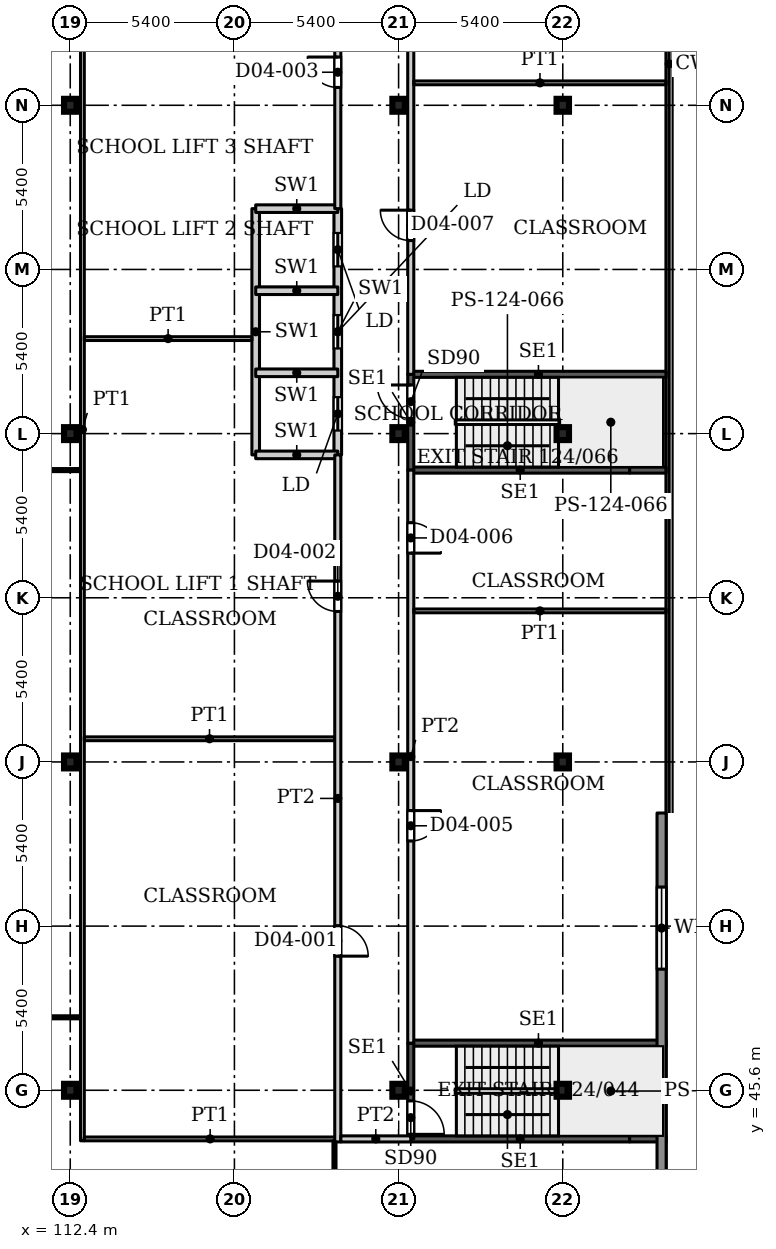
"""IFC4 building model, lengths in metres.
Left out: names, types, materials, properties, quantities, classifications, styles, units other than length and angle.
Written with IfcOpenShell. Run it as: python <this file> out.ifc"""

import sys

from ifc_helpers import new_model, si_unit, direction, frame, frame_2d, origin, origin_2d, place, context, subcontext, project, spatial, rectangle, i_section, extrude, source, transform, mapped, element, fill, save


model = new_model("IFC4")
c1 = context("Model", 3, precision=1e-05, world=origin(), true_north=direction((0.0, 1.0)))
c2 = subcontext(c1, "Body", "Model", "MODEL_VIEW")
j1 = project(units=[si_unit("LENGTHUNIT", "METRE"), si_unit("PLANEANGLEUNIT", "RADIAN")], contexts=[c1])
p1 = place(None, origin())
s1 = spatial("IfcSite", under=j1, at=p1, CompositionType="ELEMENT")
p2 = place(p1, origin())
s2 = spatial("IfcBuilding", under=s1, at=p2, CompositionType="ELEMENT")
p3 = place(p2, frame((0.0, 0.0, 21.5)))
s3 = spatial("IfcBuildingStorey", under=s2, at=p3, CompositionType="ELEMENT", Elevation=21.5)
for number, where, z_axis, x_axis in (
    (1, (112.4, 45.6, 0.0), (0.0, 0.0, 1.0), (1.0, 0.0, 0.0)),
    (2, (123.2, 45.6, 0.0), (0.0, 0.0, 1.0), (1.0, 0.0, 0.0)),
    (3, (128.6, 45.6, 0.0), (0.0, 0.0, 1.0), (1.0, 0.0, 0.0)),
    (4, (112.4, 56.4, 0.0), (0.0, 0.0, 1.0), (1.0, 0.0, 0.0)),
    (5, (123.2, 56.4, 0.0), (0.0, 0.0, 1.0), (1.0, 0.0, 0.0)),
    (6, (128.6, 56.4, 0.0), (0.0, 0.0, 1.0), (1.0, 0.0, 0.0)),
    (7, (112.4, 67.2, 0.0), (0.0, 0.0, 1.0), (1.0, 0.0, 0.0)),
    (8, (123.2, 67.2, 0.0), (0.0, 0.0, 1.0), (1.0, 0.0, 0.0)),
    (9, (128.6, 67.2, 0.0), (0.0, 0.0, 1.0), (1.0, 0.0, 0.0)),
    (10, (112.4, 78.0, 0.0), (0.0, 0.0, 1.0), (1.0, 0.0, 0.0)),
    (11, (123.2, 78.0, 0.0), (0.0, 0.0, 1.0), (1.0, 0.0, 0.0)),
    (12, (128.6, 78.0, 0.0), (0.0, 0.0, 1.0), (1.0, 0.0, 0.0)),
):
    element("IfcColumn", number, at=place(p3, frame(where, z_axis=z_axis, x_axis=x_axis)), inside=s3, PredefinedType="COLUMN", context=c2, shape_type="SweptSolid", body=[
        extrude(i_section(OverallWidth=0.409, OverallDepth=0.425, WebThickness=0.033, FlangeThickness=0.052, FilletRadius=0.013, at=origin_2d()), origin(), (0.0, 0.0, 1.0), 4.5),
    ])
p4 = place(p3, frame((131.85, 54.72, 0.0), z_axis=(0.0, 0.0, 1.0), x_axis=(0.0, -1.0, 0.0)))
e13 = element("IfcWall", 13, at=p4, inside=s3, PredefinedType="SOLIDWALL", context=c2, shape_type="SweptSolid", body=[
    extrude(rectangle(XDim=38.72, YDim=0.3, at=frame_2d((19.36, 0.0))), origin(), (0.0, 0.0, 1.0), 4.25),
])
p5 = place(p4, frame((2.435, 0.0, 0.9)))
e14 = element("IfcOpeningElement", 14, at=p5, cuts=e13, PredefinedType="OPENING", context=c2, shape_type="SweptSolid", body=[
    extrude(rectangle(XDim=2.7, YDim=2.1, at=frame_2d((1.35, 1.05))), frame((0.0, 0.16, 0.0), z_axis=(0.0, -1.0, 0.0), x_axis=(1.0, 0.0, 0.0)), (0.0, 0.0, 1.0), 0.32),
])
p6 = place(p4, frame((13.58, 0.0, 0.9)))
e15 = element("IfcOpeningElement", 15, at=p6, cuts=e13, PredefinedType="OPENING", context=c2, shape_type="SweptSolid", body=[
    extrude(rectangle(XDim=2.7, YDim=2.1, at=frame_2d((1.35, 1.05))), frame((0.0, 0.16, 0.0), z_axis=(0.0, -1.0, 0.0), x_axis=(1.0, 0.0, 0.0)), (0.0, 0.0, 1.0), 0.32),
])
p7 = place(p4, frame((26.16, 0.0, 0.9)))
e16 = element("IfcOpeningElement", 16, at=p7, cuts=e13, PredefinedType="OPENING", context=c2, shape_type="SweptSolid", body=[
    extrude(rectangle(XDim=2.7, YDim=2.1, at=frame_2d((1.35, 1.05))), frame((0.0, 0.16, 0.0), z_axis=(0.0, -1.0, 0.0), x_axis=(1.0, 0.0, 0.0)), (0.0, 0.0, 1.0), 0.32),
])
p8 = place(p3, frame((118.5, 66.5, 0.0), z_axis=(0.0, 0.0, 1.0), x_axis=(0.0, 1.0, 0.0)))
e17 = element("IfcWall", 17, at=p8, inside=s3, PredefinedType="PARTITIONING", context=c2, shape_type="SweptSolid", body=[
    extrude(rectangle(XDim=8.1, YDim=0.25, at=frame_2d((4.05, 0.0))), origin(), (0.0, 0.0, 1.0), 4.5),
])
p9 = place(p3, frame((121.2, 66.5, 0.0), z_axis=(0.0, 0.0, 1.0), x_axis=(0.0, 1.0, 0.0)))
e18 = element("IfcWall", 18, at=p9, inside=s3, PredefinedType="PARTITIONING", context=c2, shape_type="SweptSolid", body=[
    extrude(rectangle(XDim=8.1, YDim=0.25, at=frame_2d((4.05, 0.0))), origin(), (0.0, 0.0, 1.0), 4.5),
])
p10 = place(p9, frame((0.8, 0.0, 0.0)))
e19 = element("IfcOpeningElement", 19, at=p10, cuts=e18, PredefinedType="OPENING", context=c2, shape_type="SweptSolid", body=[
    extrude(rectangle(XDim=1.1, YDim=2.2, at=frame_2d((0.55, 1.1))), frame((0.0, 0.135, 0.0), z_axis=(0.0, -1.0, 0.0), x_axis=(1.0, 0.0, 0.0)), (0.0, 0.0, 1.0), 0.27),
])
p11 = place(p9, frame((3.5, 0.0, 0.0)))
e20 = element("IfcOpeningElement", 20, at=p11, cuts=e18, PredefinedType="OPENING", context=c2, shape_type="SweptSolid", body=[
    extrude(rectangle(XDim=1.1, YDim=2.2, at=frame_2d((0.55, 1.1))), frame((0.0, 0.135, 0.0), z_axis=(0.0, -1.0, 0.0), x_axis=(1.0, 0.0, 0.0)), (0.0, 0.0, 1.0), 0.27),
])
p12 = place(p9, frame((6.2, 0.0, 0.0)))
e21 = element("IfcOpeningElement", 21, at=p12, cuts=e18, PredefinedType="OPENING", context=c2, shape_type="SweptSolid", body=[
    extrude(rectangle(XDim=1.1, YDim=2.2, at=frame_2d((0.55, 1.1))), frame((0.0, 0.135, 0.0), z_axis=(0.0, -1.0, 0.0), x_axis=(1.0, 0.0, 0.0)), (0.0, 0.0, 1.0), 0.27),
])
for number, where, z_axis, x_axis in (
    (22, (118.5, 66.5, 0.0), (0.0, 0.0, 1.0), (1.0, 0.0, 0.0)),
    (23, (118.5, 69.2, 0.0), (0.0, 0.0, 1.0), (1.0, 0.0, 0.0)),
    (24, (118.5, 71.9, 0.0), (0.0, 0.0, 1.0), (1.0, 0.0, 0.0)),
    (25, (118.5, 74.6, 0.0), (0.0, 0.0, 1.0), (1.0, 0.0, 0.0)),
):
    element("IfcWall", number, at=place(p3, frame(where, z_axis=z_axis, x_axis=x_axis)), inside=s3, PredefinedType="PARTITIONING", context=c2, shape_type="SweptSolid", body=[
        extrude(rectangle(XDim=2.7, YDim=0.25, at=frame_2d((1.35, 0.0))), origin(), (0.0, 0.0, 1.0), 4.5),
    ])
p13 = place(p3, frame((123.6, 44.0, 0.0), z_axis=(0.0, 0.0, 1.0), x_axis=(1.0, 0.0, 0.0)))
e26 = element("IfcWall", 26, at=p13, inside=s3, PredefinedType="SHEAR", context=c2, shape_type="SweptSolid", body=[
    extrude(rectangle(XDim=7.2, YDim=0.2, at=frame_2d((3.6, 0.0))), origin(), (0.0, 0.0, 1.0), 4.5),
])
p14 = place(p3, frame((130.8, 44.0, 0.0), z_axis=(0.0, 0.0, 1.0), x_axis=(1.0, 0.0, 0.0)))
e27 = element("IfcWall", 27, at=p14, inside=s3, PredefinedType="SHEAR", context=c2, shape_type="SweptSolid", body=[
    extrude(rectangle(XDim=1.2, YDim=0.2, at=frame_2d((0.6, 0.0))), origin(), (0.0, 0.0, 1.0), 4.5),
])
p15 = place(p3, frame((123.6, 47.15, 0.0), z_axis=(0.0, 0.0, 1.0), x_axis=(1.0, 0.0, 0.0)))
e28 = element("IfcWall", 28, at=p15, inside=s3, PredefinedType="SHEAR", context=c2, shape_type="SweptSolid", body=[
    extrude(rectangle(XDim=8.4, YDim=0.2, at=frame_2d((4.2, 0.0))), origin(), (0.0, 0.0, 1.0), 4.5),
])
p16 = place(p3, frame((123.6, 44.0, 0.0), z_axis=(0.0, 0.0, 1.0), x_axis=(0.0, 1.0, 0.0)))
e29 = element("IfcWall", 29, at=p16, inside=s3, PredefinedType="SHEAR", context=c2, shape_type="SweptSolid", body=[
    extrude(rectangle(XDim=3.15, YDim=0.2, at=frame_2d((1.575, 0.0))), origin(), (0.0, 0.0, 1.0), 4.5),
])
p17 = place(p16, frame((0.15, 0.0, 0.0)))
e30 = element("IfcOpeningElement", 30, at=p17, cuts=e29, PredefinedType="OPENING", context=c2, shape_type="SweptSolid", body=[
    extrude(rectangle(XDim=1.1, YDim=2.2, at=frame_2d((0.55, 1.1))), frame((0.0, 0.11, 0.0), z_axis=(0.0, -1.0, 0.0), x_axis=(1.0, 0.0, 0.0)), (0.0, 0.0, 1.0), 0.22),
])
p18 = place(p3, frame((123.6, 66.0, 0.0), z_axis=(0.0, 0.0, 1.0), x_axis=(1.0, 0.0, 0.0)))
e31 = element("IfcWall", 31, at=p18, inside=s3, PredefinedType="SHEAR", context=c2, shape_type="SweptSolid", body=[
    extrude(rectangle(XDim=7.2, YDim=0.2, at=frame_2d((3.6, 0.0))), origin(), (0.0, 0.0, 1.0), 4.5),
])
p19 = place(p3, frame((130.8, 66.0, 0.0), z_axis=(0.0, 0.0, 1.0), x_axis=(1.0, 0.0, 0.0)))
e32 = element("IfcWall", 32, at=p19, inside=s3, PredefinedType="SHEAR", context=c2, shape_type="SweptSolid", body=[
    extrude(rectangle(XDim=1.2, YDim=0.2, at=frame_2d((0.6, 0.0))), origin(), (0.0, 0.0, 1.0), 4.5),
])
p20 = place(p3, frame((123.6, 69.15, 0.0), z_axis=(0.0, 0.0, 1.0), x_axis=(1.0, 0.0, 0.0)))
e33 = element("IfcWall", 33, at=p20, inside=s3, PredefinedType="SHEAR", context=c2, shape_type="SweptSolid", body=[
    extrude(rectangle(XDim=8.4, YDim=0.2, at=frame_2d((4.2, 0.0))), origin(), (0.0, 0.0, 1.0), 4.5),
])
p21 = place(p3, frame((123.6, 66.0, 0.0), z_axis=(0.0, 0.0, 1.0), x_axis=(0.0, 1.0, 0.0)))
e34 = element("IfcWall", 34, at=p21, inside=s3, PredefinedType="SHEAR", context=c2, shape_type="SweptSolid", body=[
    extrude(rectangle(XDim=3.15, YDim=0.2, at=frame_2d((1.575, 0.0))), origin(), (0.0, 0.0, 1.0), 4.5),
])
p22 = place(p21, frame((1.7, 0.0, 0.0)))
e35 = element("IfcOpeningElement", 35, at=p22, cuts=e34, PredefinedType="OPENING", context=c2, shape_type="SweptSolid", body=[
    extrude(rectangle(XDim=1.1, YDim=2.2, at=frame_2d((0.55, 1.1))), frame((0.0, 0.11, 0.0), z_axis=(0.0, -1.0, 0.0), x_axis=(1.0, 0.0, 0.0)), (0.0, 0.0, 1.0), 0.22),
])
p23 = place(p3, frame((92.6, 48.0, 0.0), z_axis=(0.0, 0.0, 1.0), x_axis=(1.0, 0.0, 0.0)))
e36 = element("IfcWall", 36, at=p23, inside=s3, PredefinedType="PARTITIONING", context=c2, shape_type="SweptSolid", body=[
    extrude(rectangle(XDim=20.138, YDim=0.1, at=frame_2d((10.069, 0.0))), origin(), (0.0, 0.0, 1.0), 4.18),
])
p24 = place(p3, frame((92.7, 66.0, 0.0), z_axis=(0.0, 0.0, 1.0), x_axis=(1.0, 0.0, 0.0)))
e37 = element("IfcWall", 37, at=p24, inside=s3, PredefinedType="PARTITIONING", context=c2, shape_type="SweptSolid", body=[
    extrude(rectangle(XDim=20.038, YDim=0.1, at=frame_2d((10.019, 0.0))), origin(), (0.0, 0.0, 1.0), 4.18),
])
p25 = place(p3, frame((112.8, 43.938, 0.0), z_axis=(0.0, 0.0, 1.0), x_axis=(0.0, 1.0, 0.0)))
e38 = element("IfcWall", 38, at=p25, inside=s3, PredefinedType="PARTITIONING", context=c2, shape_type="SweptSolid", body=[
    extrude(rectangle(XDim=46.787, YDim=0.125, at=frame_2d((23.394, 0.0))), origin(), (0.0, 0.0, 1.0), 4.18),
])
p26 = place(p3, frame((112.862, 44.0, 0.0), z_axis=(0.0, 0.0, 1.0), x_axis=(1.0, 0.0, 0.0)))
e39 = element("IfcWall", 39, at=p26, inside=s3, PredefinedType="PARTITIONING", context=c2, shape_type="SweptSolid", body=[
    extrude(rectangle(XDim=8.279, YDim=0.125, at=frame_2d((4.14, 0.0))), origin(), (0.0, 0.0, 1.0), 4.18),
])
p27 = place(p3, frame((112.862, 57.162, 0.0), z_axis=(0.0, 0.0, 1.0), x_axis=(1.0, 0.0, 0.0)))
e40 = element("IfcWall", 40, at=p27, inside=s3, PredefinedType="PARTITIONING", context=c2, shape_type="SweptSolid", body=[
    extrude(rectangle(XDim=8.238, YDim=0.125, at=frame_2d((4.119, 0.0))), origin(), (0.0, 0.0, 1.0), 4.18),
])
p28 = place(p3, frame((112.862, 70.325, 0.0), z_axis=(0.0, 0.0, 1.0), x_axis=(1.0, 0.0, 0.0)))
e41 = element("IfcWall", 41, at=p28, inside=s3, PredefinedType="PARTITIONING", context=c2, shape_type="SweptSolid", body=[
    extrude(rectangle(XDim=5.514, YDim=0.125, at=frame_2d((2.757, 0.0))), origin(), (0.0, 0.0, 1.0), 4.18),
])
p29 = place(p3, frame((121.091, 35.3, 0.0), z_axis=(0.0, 0.0, 1.0), x_axis=(0.0, 1.0, 0.0)))
e42 = element("IfcWall", 42, at=p29, inside=s3, PredefinedType="PARTITIONING", context=c2, shape_type="SweptSolid", body=[
    extrude(rectangle(XDim=8.638, YDim=0.1, at=frame_2d((4.319, 0.0))), origin(), (0.0, 0.0, 1.0), 4.18),
])
p30 = place(p3, frame((121.2, 43.9, 0.0), z_axis=(0.0, 0.0, 1.0), x_axis=(0.0, 1.0, 0.0)))
e43 = element("IfcWall", 43, at=p30, inside=s3, PredefinedType="PARTITIONING", context=c2, shape_type="SweptSolid", body=[
    extrude(rectangle(XDim=22.6, YDim=0.2, at=frame_2d((11.3, 0.0))), origin(), (0.0, 0.0, 1.0), 4.18),
])
p31 = place(p30, frame((6.112, 0.0, 0.0)))
e44 = element("IfcOpeningElement", 44, at=p31, cuts=e43, PredefinedType="OPENING", context=c2, shape_type="SweptSolid", body=[
    extrude(rectangle(XDim=1.0, YDim=2.1, at=frame_2d((0.5, 1.05))), frame((0.0, 0.11, 0.0), z_axis=(0.0, -1.0, 0.0), x_axis=(1.0, 0.0, 0.0)), (0.0, 0.0, 1.0), 0.22),
])
p32 = place(p30, frame((17.45, 0.0, 0.0)))
e45 = element("IfcOpeningElement", 45, at=p32, cuts=e43, PredefinedType="OPENING", context=c2, shape_type="SweptSolid", body=[
    extrude(rectangle(XDim=1.0, YDim=2.1, at=frame_2d((0.5, 1.05))), frame((0.0, 0.11, 0.0), z_axis=(0.0, -1.0, 0.0), x_axis=(1.0, 0.0, 0.0)), (0.0, 0.0, 1.0), 0.22),
])
p33 = place(p3, frame((121.2, 74.6, 0.0), z_axis=(0.0, 0.0, 1.0), x_axis=(0.0, 1.0, 0.0)))
e46 = element("IfcWall", 46, at=p33, inside=s3, PredefinedType="PARTITIONING", context=c2, shape_type="SweptSolid", body=[
    extrude(rectangle(XDim=16.1, YDim=0.2, at=frame_2d((8.05, 0.0))), origin(), (0.0, 0.0, 1.0), 4.18),
])
p34 = place(p33, frame((3.987, 0.0, 0.0)))
e47 = element("IfcOpeningElement", 47, at=p34, cuts=e46, PredefinedType="OPENING", context=c2, shape_type="SweptSolid", body=[
    extrude(rectangle(XDim=1.0, YDim=2.1, at=frame_2d((0.5, 1.05))), frame((0.0, 0.11, 0.0), z_axis=(0.0, -1.0, 0.0), x_axis=(1.0, 0.0, 0.0)), (0.0, 0.0, 1.0), 0.22),
])
p35 = place(p33, frame((12.05, 0.0, 0.0)))
e48 = element("IfcOpeningElement", 48, at=p35, cuts=e46, PredefinedType="OPENING", context=c2, shape_type="SweptSolid", body=[
    extrude(rectangle(XDim=1.0, YDim=2.1, at=frame_2d((0.5, 1.05))), frame((0.0, 0.11, 0.0), z_axis=(0.0, -1.0, 0.0), x_axis=(1.0, 0.0, 0.0)), (0.0, 0.0, 1.0), 0.22),
])
p36 = place(p3, frame((121.3, 44.0, 0.0), z_axis=(0.0, 0.0, 1.0), x_axis=(1.0, 0.0, 0.0)))
e49 = element("IfcWall", 49, at=p36, inside=s3, PredefinedType="PARTITIONING", context=c2, shape_type="SweptSolid", body=[
    extrude(rectangle(XDim=2.3, YDim=0.2, at=frame_2d((1.15, 0.0))), origin(), (0.0, 0.0, 1.0), 4.18),
])
p37 = place(p3, frame((123.6, 47.15, 0.0), z_axis=(0.0, 0.0, 1.0), x_axis=(0.0, 1.0, 0.0)))
e50 = element("IfcWall", 50, at=p37, inside=s3, PredefinedType="PARTITIONING", context=c2, shape_type="SweptSolid", body=[
    extrude(rectangle(XDim=18.85, YDim=0.2, at=frame_2d((9.425, 0.0))), origin(), (0.0, 0.0, 1.0), 4.18),
])
p38 = place(p37, frame((6.65, 0.0, 0.0)))
e51 = element("IfcOpeningElement", 51, at=p38, cuts=e50, PredefinedType="OPENING", context=c2, shape_type="SweptSolid", body=[
    extrude(rectangle(XDim=1.0, YDim=2.1, at=frame_2d((0.5, 1.05))), frame((0.0, 0.11, 0.0), z_axis=(0.0, -1.0, 0.0), x_axis=(1.0, 0.0, 0.0)), (0.0, 0.0, 1.0), 0.22),
])
p39 = place(p37, frame((16.119, 0.0, 0.0)))
e52 = element("IfcOpeningElement", 52, at=p39, cuts=e50, PredefinedType="OPENING", context=c2, shape_type="SweptSolid", body=[
    extrude(rectangle(XDim=1.0, YDim=2.1, at=frame_2d((0.5, 1.05))), frame((0.0, 0.11, 0.0), z_axis=(0.0, -1.0, 0.0), x_axis=(1.0, 0.0, 0.0)), (0.0, 0.0, 1.0), 0.22),
])
p40 = place(p3, frame((123.6, 69.15, 0.0), z_axis=(0.0, 0.0, 1.0), x_axis=(0.0, 1.0, 0.0)))
e53 = element("IfcWall", 53, at=p40, inside=s3, PredefinedType="PARTITIONING", context=c2, shape_type="SweptSolid", body=[
    extrude(rectangle(XDim=21.55, YDim=0.2, at=frame_2d((10.775, 0.0))), origin(), (0.0, 0.0, 1.0), 4.18),
])
p41 = place(p40, frame((4.4, 0.0, 0.0)))
e54 = element("IfcOpeningElement", 54, at=p41, cuts=e53, PredefinedType="OPENING", context=c2, shape_type="SweptSolid", body=[
    extrude(rectangle(XDim=1.0, YDim=2.1, at=frame_2d((0.5, 1.05))), frame((0.0, 0.11, 0.0), z_axis=(0.0, -1.0, 0.0), x_axis=(1.0, 0.0, 0.0)), (0.0, 0.0, 1.0), 0.22),
])
p42 = place(p40, frame((15.238, 0.0, 0.0)))
e55 = element("IfcOpeningElement", 55, at=p42, cuts=e53, PredefinedType="OPENING", context=c2, shape_type="SweptSolid", body=[
    extrude(rectangle(XDim=1.0, YDim=2.1, at=frame_2d((0.5, 1.05))), frame((0.0, 0.11, 0.0), z_axis=(0.0, -1.0, 0.0), x_axis=(1.0, 0.0, 0.0)), (0.0, 0.0, 1.0), 0.22),
])
p43 = place(p40, frame((11.238, 0.0, 0.0)))
e56 = element("IfcOpeningElement", 56, at=p43, cuts=e53, PredefinedType="OPENING", context=c2, shape_type="SweptSolid", body=[
    extrude(rectangle(XDim=1.2, YDim=2.1, at=frame_2d((0.6, 1.05))), frame((0.0, 0.11, 0.0), z_axis=(0.0, -1.0, 0.0), x_axis=(1.0, 0.0, 0.0)), (0.0, 0.0, 1.0), 0.22),
])
for number, where, z_axis, x_axis in (
    (57, (123.7, 61.369, 0.0), (0.0, 0.0, 1.0), (1.0, 0.0, 0.0)),
    (58, (123.7, 78.738, 0.0), (0.0, 0.0, 1.0), (1.0, 0.0, 0.0)),
):
    element("IfcWall", number, at=place(p3, frame(where, z_axis=z_axis, x_axis=x_axis)), inside=s3, PredefinedType="PARTITIONING", context=c2, shape_type="SweptSolid", body=[
        extrude(rectangle(XDim=8.3, YDim=0.125, at=frame_2d((4.15, 0.0))), origin(), (0.0, 0.0, 1.0), 4.18),
    ])
m1 = source(origin(), c2, "Body", "SweptSolid", [
    extrude(rectangle(XDim=2.7, YDim=2.1, at=frame_2d((1.35, 1.05))), frame((0.0, 0.03, 0.0), z_axis=(0.0, -1.0, 0.0), x_axis=(1.0, 0.0, 0.0)), (0.0, 0.0, 1.0), 0.06),
])
p44 = place(p5, origin())
e59 = element("IfcWindow", 59, at=p44, inside=s3, PartitioningType="SINGLE_PANEL", PredefinedType="WINDOW", context=c2, shape_type="MappedRepresentation", body=[
    mapped(m1, transform((0.0, 0.0, 0.0), x_axis=(1.0, 0.0, 0.0), y_axis=(0.0, 1.0, 0.0), z_axis=(0.0, 0.0, 1.0), scale=1.0)),
])
fill(e14, e59)
m2 = source(origin(), c2, "Body", "SweptSolid", [
    extrude(rectangle(XDim=1.1, YDim=2.2, at=frame_2d((0.55, 1.1))), frame((0.0, 0.025, 0.0), z_axis=(0.0, -1.0, 0.0), x_axis=(1.0, 0.0, 0.0)), (0.0, 0.0, 1.0), 0.05),
])
p45 = place(p10, origin())
e60 = element("IfcDoor", 60, at=p45, inside=s3, OperationType="SLIDING_TO_LEFT", PredefinedType="DOOR", context=c2, shape_type="MappedRepresentation", body=[
    mapped(m2, transform((0.0, 0.0, 0.0), x_axis=(1.0, 0.0, 0.0), y_axis=(0.0, 1.0, 0.0), z_axis=(0.0, 0.0, 1.0), scale=1.0)),
])
fill(e19, e60)
p46 = place(p11, origin())
e61 = element("IfcDoor", 61, at=p46, inside=s3, OperationType="SLIDING_TO_LEFT", PredefinedType="DOOR", context=c2, shape_type="MappedRepresentation", body=[
    mapped(m2, transform((0.0, 0.0, 0.0), x_axis=(1.0, 0.0, 0.0), y_axis=(0.0, 1.0, 0.0), z_axis=(0.0, 0.0, 1.0), scale=1.0)),
])
fill(e20, e61)
p47 = place(p12, origin())
e62 = element("IfcDoor", 62, at=p47, inside=s3, OperationType="SLIDING_TO_LEFT", PredefinedType="DOOR", context=c2, shape_type="MappedRepresentation", body=[
    mapped(m2, transform((0.0, 0.0, 0.0), x_axis=(1.0, 0.0, 0.0), y_axis=(0.0, 1.0, 0.0), z_axis=(0.0, 0.0, 1.0), scale=1.0)),
])
fill(e21, e62)
m3 = source(origin(), c2, "Body", "SweptSolid", [
    extrude(rectangle(XDim=1.1, YDim=2.2, at=frame_2d((0.55, 1.1))), frame((0.0, 0.025, 0.0), z_axis=(0.0, -1.0, 0.0), x_axis=(1.0, 0.0, 0.0)), (0.0, 0.0, 1.0), 0.05),
])
p48 = place(p17, origin())
e63 = element("IfcDoor", 63, at=p48, inside=s3, OperationType="SINGLE_SWING_RIGHT", PredefinedType="DOOR", context=c2, shape_type="MappedRepresentation", body=[
    mapped(m3, transform((0.0, 0.0, 0.0), x_axis=(1.0, 0.0, 0.0), y_axis=(0.0, 1.0, 0.0), z_axis=(0.0, 0.0, 1.0), scale=1.0)),
])
fill(e30, e63)
p49 = place(p22, origin())
e64 = element("IfcDoor", 64, at=p49, inside=s3, OperationType="SINGLE_SWING_LEFT", PredefinedType="DOOR", context=c2, shape_type="MappedRepresentation", body=[
    mapped(m3, transform((0.0, 0.0, 0.0), x_axis=(1.0, 0.0, 0.0), y_axis=(0.0, 1.0, 0.0), z_axis=(0.0, 0.0, 1.0), scale=1.0)),
])
fill(e35, e64)
m4 = source(origin(), c2, "Body", "SweptSolid", [
    extrude(rectangle(XDim=1.0, YDim=2.1, at=frame_2d((0.5, 1.05))), frame((0.0, 0.025, 0.0), z_axis=(0.0, -1.0, 0.0), x_axis=(1.0, 0.0, 0.0)), (0.0, 0.0, 1.0), 0.05),
])
p50 = place(p31, origin())
e65 = element("IfcDoor", 65, at=p50, inside=s3, OperationType="SINGLE_SWING_RIGHT", PredefinedType="DOOR", context=c2, shape_type="MappedRepresentation", body=[
    mapped(m4, transform((0.0, 0.0, 0.0), x_axis=(1.0, 0.0, 0.0), y_axis=(0.0, 1.0, 0.0), z_axis=(0.0, 0.0, 1.0), scale=1.0)),
])
fill(e44, e65)
p51 = place(p32, origin())
e66 = element("IfcDoor", 66, at=p51, inside=s3, OperationType="SINGLE_SWING_LEFT", PredefinedType="DOOR", context=c2, shape_type="MappedRepresentation", body=[
    mapped(m4, transform((0.0, 0.0, 0.0), x_axis=(1.0, 0.0, 0.0), y_axis=(0.0, 1.0, 0.0), z_axis=(0.0, 0.0, 1.0), scale=1.0)),
])
fill(e45, e66)
p52 = place(p34, origin())
e67 = element("IfcDoor", 67, at=p52, inside=s3, OperationType="SINGLE_SWING_LEFT", PredefinedType="DOOR", context=c2, shape_type="MappedRepresentation", body=[
    mapped(m4, transform((0.0, 0.0, 0.0), x_axis=(1.0, 0.0, 0.0), y_axis=(0.0, 1.0, 0.0), z_axis=(0.0, 0.0, 1.0), scale=1.0)),
])
fill(e47, e67)
p53 = place(p38, origin())
e68 = element("IfcDoor", 68, at=p53, inside=s3, OperationType="SINGLE_SWING_RIGHT", PredefinedType="DOOR", context=c2, shape_type="MappedRepresentation", body=[
    mapped(m4, transform((0.0, 0.0, 0.0), x_axis=(1.0, 0.0, 0.0), y_axis=(0.0, 1.0, 0.0), z_axis=(0.0, 0.0, 1.0), scale=1.0)),
])
fill(e51, e68)
p54 = place(p39, origin())
e69 = element("IfcDoor", 69, at=p54, inside=s3, OperationType="SINGLE_SWING_RIGHT", PredefinedType="DOOR", context=c2, shape_type="MappedRepresentation", body=[
    mapped(m4, transform((0.0, 0.0, 0.0), x_axis=(1.0, 0.0, 0.0), y_axis=(0.0, 1.0, 0.0), z_axis=(0.0, 0.0, 1.0), scale=1.0)),
])
fill(e52, e69)
p55 = place(p41, origin())
e70 = element("IfcDoor", 70, at=p55, inside=s3, OperationType="SINGLE_SWING_LEFT", PredefinedType="DOOR", context=c2, shape_type="MappedRepresentation", body=[
    mapped(m4, transform((0.0, 0.0, 0.0), x_axis=(1.0, 0.0, 0.0), y_axis=(0.0, 1.0, 0.0), z_axis=(0.0, 0.0, 1.0), scale=1.0)),
])
fill(e54, e70)
save(model, sys.argv[1])
